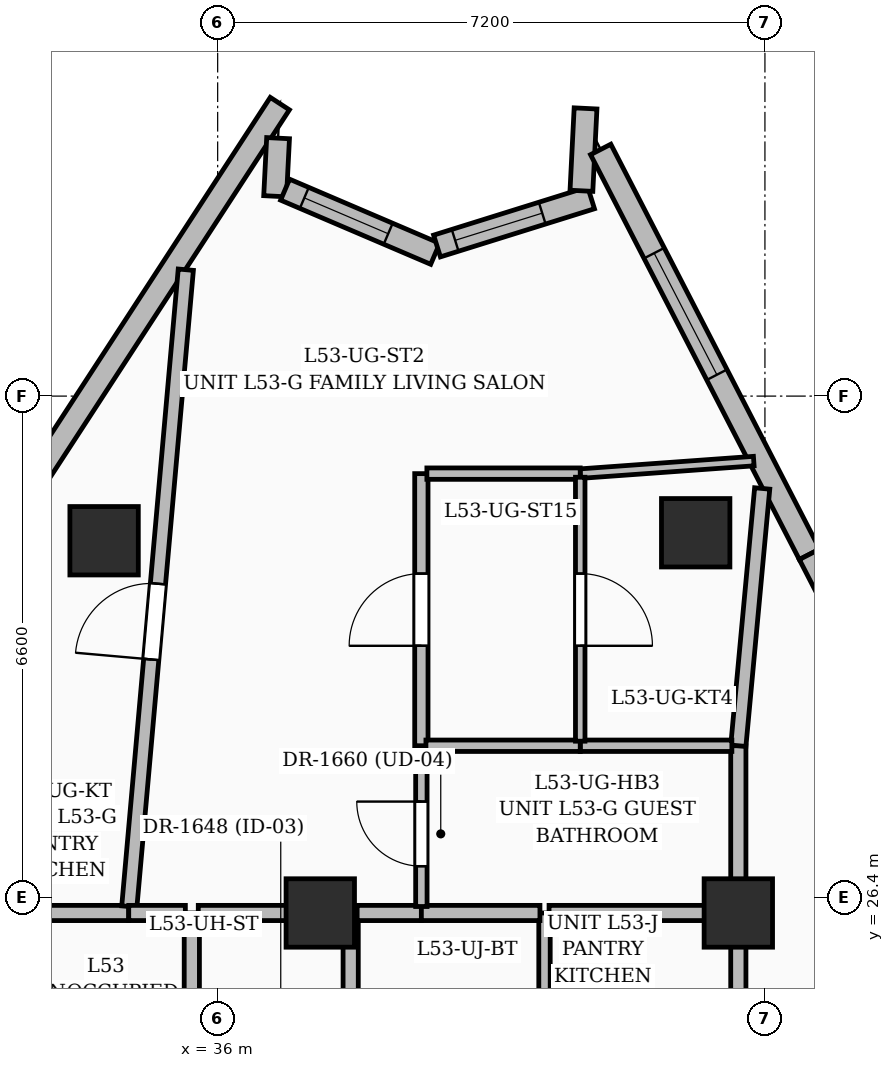
"""IFC4 building model, lengths in metres.
Left out: names, types, materials, properties, quantities, classifications, styles, units other than length and angle.
Written with IfcOpenShell. Run it as: python <this file> out.ifc"""

import sys

from ifc_helpers import new_model, si_unit, direction, frame, frame_2d, origin, origin_2d, place, context, subcontext, project, spatial, rectangle, extrude, element, fill, save


model = new_model("IFC4")
c1 = context("Model", 3, precision=1e-05, world=origin(), true_north=direction((0.0, 1.0)))
c2 = subcontext(c1, "Body", "Model", "MODEL_VIEW")
j1 = project(units=[si_unit("LENGTHUNIT", "METRE"), si_unit("PLANEANGLEUNIT", "RADIAN")], contexts=[c1])
p1 = place(None, origin())
s1 = spatial("IfcSite", under=j1, at=p1, CompositionType="ELEMENT")
p2 = place(p1, origin())
s2 = spatial("IfcBuilding", under=s1, at=p2, CompositionType="ELEMENT")
p3 = place(p2, frame((0.0, 0.0, 207.0)))
s3 = spatial("IfcBuildingStorey", under=s2, at=p3, CompositionType="ELEMENT", Elevation=207.0)
for number, where, z_axis, x_axis in (
    (1, (42.85, 26.2, 0.0), (0.0, 0.0, 1.0), (1.0, 0.0, 0.0)),
    (2, (37.35, 26.2, 0.0), (0.0, 0.0, 1.0), (1.0, 0.0, 0.0)),
    (3, (42.289, 31.202, 0.0), (0.0, 0.0, 1.0), (1.0, 0.0, 0.0)),
    (4, (34.506, 31.097, 0.0), (0.0, 0.0, 1.0), (1.0, 0.0, 0.0)),
):
    element("IfcColumn", number, at=place(p3, frame(where, z_axis=z_axis, x_axis=x_axis)), inside=s3, PredefinedType="COLUMN", context=c2, shape_type="SweptSolid", body=[
        extrude(rectangle(XDim=0.9, YDim=0.9, at=origin_2d()), origin(), (0.0, 0.0, 1.0), 3.75),
    ])
p4 = place(p3, frame((33.174, 31.251, 0.0), z_axis=(0.0, 0.0, 1.0), x_axis=(0.545624217243, 0.838029959821, 0.0)))
e5 = element("IfcWall", 5, at=p4, inside=s3, PredefinedType="SOLIDWALL", context=c2, shape_type="SweptSolid", body=[
    extrude(rectangle(XDim=6.679, YDim=0.3, at=frame_2d((3.339, 0.0))), origin(), (0.0, 0.0, 1.0), 3.5),
])
p5 = place(p3, frame((36.795, 36.394, 0.0), z_axis=(0.0, 0.0, 1.0), x_axis=(-0.051035290984, -0.998696850438, 0.0)))
e6 = element("IfcWall", 6, at=p5, inside=s3, PredefinedType="SOLIDWALL", context=c2, shape_type="SweptSolid", body=[
    extrude(rectangle(XDim=0.765, YDim=0.3, at=frame_2d((0.383, 0.0))), origin(), (0.0, 0.0, 1.0), 3.5),
])
p6 = place(p3, frame((36.887, 35.716, 0.0), z_axis=(0.0, 0.0, 1.0), x_axis=(0.919567916171, -0.392931097711, 0.0)))
e7 = element("IfcWall", 7, at=p6, inside=s3, PredefinedType="SOLIDWALL", context=c2, shape_type="SweptSolid", body=[
    extrude(rectangle(XDim=2.147, YDim=0.3, at=frame_2d((1.074, 0.0))), origin(), (0.0, 0.0, 1.0), 3.5),
])
p7 = place(p6, frame((0.275, 0.0, 0.8)))
e8 = element("IfcOpeningElement", 8, at=p7, cuts=e7, PredefinedType="OPENING", context=c2, shape_type="SweptSolid", body=[
    extrude(rectangle(XDim=1.2, YDim=1.8, at=frame_2d((0.6, 0.9))), frame((0.0, 0.16, 0.0), z_axis=(0.0, -1.0, 0.0), x_axis=(1.0, 0.0, 0.0)), (0.0, 0.0, 1.0), 0.32),
])
p8 = place(p3, frame((38.886, 34.975, 0.0), z_axis=(0.0, 0.0, 1.0), x_axis=(0.954524975295, 0.298130963736, 0.0)))
e9 = element("IfcWall", 9, at=p8, inside=s3, PredefinedType="SOLIDWALL", context=c2, shape_type="SweptSolid", body=[
    extrude(rectangle(XDim=2.124, YDim=0.3, at=frame_2d((1.062, 0.0))), origin(), (0.0, 0.0, 1.0), 3.5),
])
p9 = place(p8, frame((0.25, 0.0, 0.8)))
e10 = element("IfcOpeningElement", 10, at=p9, cuts=e9, PredefinedType="OPENING", context=c2, shape_type="SweptSolid", body=[
    extrude(rectangle(XDim=1.2, YDim=1.8, at=frame_2d((0.6, 0.9))), frame((0.0, 0.16, 0.0), z_axis=(0.0, -1.0, 0.0), x_axis=(1.0, 0.0, 0.0)), (0.0, 0.0, 1.0), 0.32),
])
p10 = place(p3, frame((40.786, 35.701, 0.0), z_axis=(0.0, 0.0, 1.0), x_axis=(0.05016199642, 0.998741094636, 0.0)))
e11 = element("IfcWall", 11, at=p10, inside=s3, PredefinedType="SOLIDWALL", context=c2, shape_type="SweptSolid", body=[
    extrude(rectangle(XDim=1.085, YDim=0.3, at=frame_2d((0.543, 0.0))), origin(), (0.0, 0.0, 1.0), 3.5),
])
p11 = place(p3, frame((41.039, 36.245, 0.0), z_axis=(0.0, 0.0, 1.0), x_axis=(0.458292150172, -0.888801611773, 0.0)))
e12 = element("IfcWall", 12, at=p11, inside=s3, PredefinedType="SOLIDWALL", context=c2, shape_type="SweptSolid", body=[
    extrude(rectangle(XDim=5.993, YDim=0.3, at=frame_2d((2.997, 0.0))), origin(), (0.0, 0.0, 1.0), 3.5),
])
p12 = place(p11, frame((1.535, 0.0, 0.6)))
e13 = element("IfcOpeningElement", 13, at=p12, cuts=e12, PredefinedType="OPENING", context=c2, shape_type="SweptSolid", body=[
    extrude(rectangle(XDim=1.8, YDim=2.1, at=frame_2d((0.9, 1.05))), frame((0.0, 0.16, 0.0), z_axis=(0.0, -1.0, 0.0), x_axis=(1.0, 0.0, 0.0)), (0.0, 0.0, 1.0), 0.32),
])
p13 = place(p3, frame((43.786, 30.918, 0.0), z_axis=(0.0, 0.0, 1.0), x_axis=(0.458349099599, -0.888772244671, 0.0)))
e14 = element("IfcWall", 14, at=p13, inside=s3, PredefinedType="SOLIDWALL", context=c2, shape_type="SweptSolid", body=[
    extrude(rectangle(XDim=6.583, YDim=0.3, at=frame_2d((3.292, 0.0))), origin(), (0.0, 0.0, 1.0), 3.5),
])
p14 = place(p13, frame((2.475, 0.0, 0.55)))
e15 = element("IfcOpeningElement", 15, at=p14, cuts=e14, PredefinedType="OPENING", context=c2, shape_type="SweptSolid", body=[
    extrude(rectangle(XDim=1.6, YDim=2.2, at=frame_2d((0.8, 1.1))), frame((0.0, 0.16, 0.0), z_axis=(0.0, -1.0, 0.0), x_axis=(1.0, 0.0, 0.0)), (0.0, 0.0, 1.0), 0.32),
])
p15 = place(p3, frame((33.485, 26.2, 0.0), z_axis=(0.0, 0.0, 1.0), x_axis=(1.0, 0.0, 0.0)))
e16 = element("IfcWall", 16, at=p15, inside=s3, PredefinedType="PARTITIONING", context=c2, shape_type="SweptSolid", body=[
    extrude(rectangle(XDim=1.345, YDim=0.2, at=frame_2d((0.672, 0.0))), origin(), (0.0, 0.0, 1.0), 3.061),
])
p16 = place(p3, frame((34.838, 26.285, 0.0), z_axis=(0.0, 0.0, 1.0), x_axis=(0.088352923437, 0.996089233412, 0.0)))
e17 = element("IfcWall", 17, at=p16, inside=s3, PredefinedType="PARTITIONING", context=c2, shape_type="SweptSolid", body=[
    extrude(rectangle(XDim=8.411, YDim=0.2, at=frame_2d((4.206, 0.0))), origin(), (0.0, 0.0, 1.0), 2.685),
])
p17 = place(p16, frame((3.264, 0.0, 0.0)))
e18 = element("IfcOpeningElement", 18, at=p17, cuts=e17, PredefinedType="OPENING", context=c2, shape_type="SweptSolid", body=[
    extrude(rectangle(XDim=1.0, YDim=2.2, at=frame_2d((0.5, 1.1))), frame((0.0, 0.11, 0.0), z_axis=(0.0, -1.0, 0.0), x_axis=(1.0, 0.0, 0.0)), (0.0, 0.0, 1.0), 0.22),
])
p18 = place(p3, frame((35.66, 26.2, 0.0), z_axis=(0.0, 0.0, 1.0), x_axis=(0.0, -1.0, 0.0)))
e19 = element("IfcWall", 19, at=p18, inside=s3, PredefinedType="PARTITIONING", context=c2, shape_type="SweptSolid", body=[
    extrude(rectangle(XDim=1.8, YDim=0.2, at=frame_2d((0.9, 0.0))), origin(), (0.0, 0.0, 1.0), 3.061),
])
p19 = place(p3, frame((37.75, 24.485, 0.0), z_axis=(0.0, 0.0, 1.0), x_axis=(0.0, 1.0, 0.0)))
e20 = element("IfcWall", 20, at=p19, inside=s3, PredefinedType="PARTITIONING", context=c2, shape_type="SweptSolid", body=[
    extrude(rectangle(XDim=1.715, YDim=0.2, at=frame_2d((0.857, 0.0))), origin(), (0.0, 0.0, 1.0), 2.685),
])
p20 = place(p3, frame((37.665, 26.2, 0.0), z_axis=(0.0, 0.0, 1.0), x_axis=(-1.0, 0.0, 0.0)))
e21 = element("IfcWall", 21, at=p20, inside=s3, PredefinedType="PARTITIONING", context=c2, shape_type="SweptSolid", body=[
    extrude(rectangle(XDim=1.92, YDim=0.2, at=frame_2d((0.96, 0.0))), origin(), (0.0, 0.0, 1.0), 3.061),
])
p21 = place(p3, frame((35.575, 26.2, 0.0), z_axis=(0.0, 0.0, 1.0), x_axis=(-1.0, 0.0, 0.0)))
e22 = element("IfcWall", 22, at=p21, inside=s3, PredefinedType="PARTITIONING", context=c2, shape_type="SweptSolid", body=[
    extrude(rectangle(XDim=0.745, YDim=0.2, at=frame_2d((0.373, 0.0))), origin(), (0.0, 0.0, 1.0), 3.061),
])
p22 = place(p3, frame((40.3, 26.2, 0.0), z_axis=(0.0, 0.0, 1.0), x_axis=(0.0, -1.0, 0.0)))
e23 = element("IfcWall", 23, at=p22, inside=s3, PredefinedType="PARTITIONING", context=c2, shape_type="SweptSolid", body=[
    extrude(rectangle(XDim=1.972, YDim=0.15, at=frame_2d((0.986, 0.0))), origin(), (0.0, 0.0, 1.0), 2.685),
])
p23 = place(p3, frame((42.85, 24.228, 0.0), z_axis=(0.0, 0.0, 1.0), x_axis=(0.0, 1.0, 0.0)))
e24 = element("IfcWall", 24, at=p23, inside=s3, PredefinedType="PARTITIONING", context=c2, shape_type="SweptSolid", body=[
    extrude(rectangle(XDim=1.972, YDim=0.2, at=frame_2d((0.986, 0.0))), origin(), (0.0, 0.0, 1.0), 2.685),
])
p24 = place(p3, frame((42.765, 26.2, 0.0), z_axis=(0.0, 0.0, 1.0), x_axis=(-1.0, 0.0, 0.0)))
e25 = element("IfcWall", 25, at=p24, inside=s3, PredefinedType="PARTITIONING", context=c2, shape_type="SweptSolid", body=[
    extrude(rectangle(XDim=2.405, YDim=0.2, at=frame_2d((1.202, 0.0))), origin(), (0.0, 0.0, 1.0), 2.685),
])
p25 = place(p3, frame((38.68, 26.2, 0.0), z_axis=(0.0, 0.0, 1.0), x_axis=(-1.0, 0.0, 0.0)))
e26 = element("IfcWall", 26, at=p25, inside=s3, PredefinedType="PARTITIONING", context=c2, shape_type="SweptSolid", body=[
    extrude(rectangle(XDim=0.845, YDim=0.2, at=frame_2d((0.422, 0.0))), origin(), (0.0, 0.0, 1.0), 2.685),
])
p26 = place(p3, frame((40.24, 26.2, 0.0), z_axis=(0.0, 0.0, 1.0), x_axis=(-1.0, 0.0, 0.0)))
e27 = element("IfcWall", 27, at=p26, inside=s3, PredefinedType="PARTITIONING", context=c2, shape_type="SweptSolid", body=[
    extrude(rectangle(XDim=1.56, YDim=0.2, at=frame_2d((0.78, 0.0))), origin(), (0.0, 0.0, 1.0), 2.685),
])
p27 = place(p3, frame((42.85, 28.4, 0.0), z_axis=(0.0, 0.0, 1.0), x_axis=(0.0, -1.0, 0.0)))
e28 = element("IfcWall", 28, at=p27, inside=s3, PredefinedType="PARTITIONING", context=c2, shape_type="SweptSolid", body=[
    extrude(rectangle(XDim=2.2, YDim=0.2, at=frame_2d((1.1, 0.0))), origin(), (0.0, 0.0, 1.0), 2.685),
])
p28 = place(p3, frame((43.164, 31.785, 0.0), z_axis=(0.0, 0.0, 1.0), x_axis=(-0.092355124874, -0.995726132483, 0.0)))
e29 = element("IfcWall", 29, at=p28, inside=s3, PredefinedType="PARTITIONING", context=c2, shape_type="SweptSolid", body=[
    extrude(rectangle(XDim=3.4, YDim=0.2, at=frame_2d((1.7, 0.0))), origin(), (0.0, 0.0, 1.0), 2.685),
])
p29 = place(p3, frame((38.68, 26.285, 0.0), z_axis=(0.0, 0.0, 1.0), x_axis=(0.0, 1.0, 0.0)))
e30 = element("IfcWall", 30, at=p29, inside=s3, PredefinedType="PARTITIONING", context=c2, shape_type="SweptSolid", body=[
    extrude(rectangle(XDim=2.115, YDim=0.15, at=frame_2d((1.058, 0.0))), origin(), (0.0, 0.0, 1.0), 2.685),
])
p30 = place(p29, frame((0.531, 0.0, 0.0)))
e31 = element("IfcOpeningElement", 31, at=p30, cuts=e30, PredefinedType="OPENING", context=c2, shape_type="SweptSolid", body=[
    extrude(rectangle(XDim=0.85, YDim=2.1, at=frame_2d((0.425, 1.05))), frame((0.0, 0.085, 0.0), z_axis=(0.0, -1.0, 0.0), x_axis=(1.0, 0.0, 0.0)), (0.0, 0.0, 1.0), 0.17),
])
p31 = place(p3, frame((40.77, 31.98, 0.0), z_axis=(0.0, 0.0, 1.0), x_axis=(0.997397150256, 0.072103568984, 0.0)))
e32 = element("IfcWall", 32, at=p31, inside=s3, PredefinedType="PARTITIONING", context=c2, shape_type="SweptSolid", body=[
    extrude(rectangle(XDim=2.289, YDim=0.125, at=frame_2d((1.145, 0.0))), origin(), (0.0, 0.0, 1.0), 3.5),
])
p32 = place(p3, frame((38.68, 28.4, 0.0), z_axis=(0.0, 0.0, 1.0), x_axis=(0.0, 1.0, 0.0)))
e33 = element("IfcWall", 33, at=p32, inside=s3, PredefinedType="PARTITIONING", context=c2, shape_type="SweptSolid", body=[
    extrude(rectangle(XDim=3.58, YDim=0.175, at=frame_2d((1.79, 0.0))), origin(), (0.0, 0.0, 1.0), 2.82),
])
p33 = place(p32, frame((1.315, 0.0, 0.0)))
e34 = element("IfcOpeningElement", 34, at=p33, cuts=e33, PredefinedType="OPENING", context=c2, shape_type="SweptSolid", body=[
    extrude(rectangle(XDim=0.95, YDim=2.2, at=frame_2d((0.475, 1.1))), frame((0.0, 0.097, 0.0), z_axis=(0.0, -1.0, 0.0), x_axis=(1.0, 0.0, 0.0)), (0.0, 0.0, 1.0), 0.195),
])
p34 = place(p3, frame((38.752, 31.98, 0.0), z_axis=(0.0, 0.0, 1.0), x_axis=(1.0, 0.0, 0.0)))
e35 = element("IfcWall", 35, at=p34, inside=s3, PredefinedType="PARTITIONING", context=c2, shape_type="SweptSolid", body=[
    extrude(rectangle(XDim=2.018, YDim=0.15, at=frame_2d((1.009, 0.0))), origin(), (0.0, 0.0, 1.0), 3.5),
])
p35 = place(p3, frame((42.765, 28.4, 0.0), z_axis=(0.0, 0.0, 1.0), x_axis=(-1.0, 0.0, 0.0)))
e36 = element("IfcWall", 36, at=p35, inside=s3, PredefinedType="PARTITIONING", context=c2, shape_type="SweptSolid", body=[
    extrude(rectangle(XDim=1.995, YDim=0.15, at=frame_2d((0.998, 0.0))), origin(), (0.0, 0.0, 1.0), 2.685),
])
p36 = place(p3, frame((40.77, 28.4, 0.0), z_axis=(0.0, 0.0, 1.0), x_axis=(-1.0, 0.0, 0.0)))
e37 = element("IfcWall", 37, at=p36, inside=s3, PredefinedType="PARTITIONING", context=c2, shape_type="SweptSolid", body=[
    extrude(rectangle(XDim=2.03, YDim=0.15, at=frame_2d((1.015, 0.0))), origin(), (0.0, 0.0, 1.0), 3.5),
])
p37 = place(p3, frame((40.77, 31.933, 0.0), z_axis=(0.0, 0.0, 1.0), x_axis=(0.0, -1.0, 0.0)))
e38 = element("IfcWall", 38, at=p37, inside=s3, PredefinedType="PARTITIONING", context=c2, shape_type="SweptSolid", body=[
    extrude(rectangle(XDim=3.473, YDim=0.125, at=frame_2d((1.736, 0.0))), origin(), (0.0, 0.0, 1.0), 2.82),
])
p38 = place(p37, frame((1.268, 0.0, 0.0)))
e39 = element("IfcOpeningElement", 39, at=p38, cuts=e38, PredefinedType="OPENING", context=c2, shape_type="SweptSolid", body=[
    extrude(rectangle(XDim=0.95, YDim=2.2, at=frame_2d((0.475, 1.1))), frame((0.0, 0.072, 0.0), z_axis=(0.0, -1.0, 0.0), x_axis=(1.0, 0.0, 0.0)), (0.0, 0.0, 1.0), 0.145),
])
p39 = place(p7, origin())
e40 = element("IfcWindow", 40, at=p39, inside=s3, PartitioningType="SINGLE_PANEL", PredefinedType="WINDOW", context=c2, shape_type="SweptSolid", body=[
    extrude(rectangle(XDim=1.2, YDim=1.8, at=frame_2d((0.6, 0.9))), frame((0.0, 0.03, 0.0), z_axis=(0.0, -1.0, 0.0), x_axis=(1.0, 0.0, 0.0)), (0.0, 0.0, 1.0), 0.06),
])
fill(e8, e40)
p40 = place(p9, origin())
e41 = element("IfcWindow", 41, at=p40, inside=s3, PartitioningType="SINGLE_PANEL", PredefinedType="WINDOW", context=c2, shape_type="SweptSolid", body=[
    extrude(rectangle(XDim=1.2, YDim=1.8, at=frame_2d((0.6, 0.9))), frame((0.0, 0.03, 0.0), z_axis=(0.0, -1.0, 0.0), x_axis=(1.0, 0.0, 0.0)), (0.0, 0.0, 1.0), 0.06),
])
fill(e10, e41)
p41 = place(p12, origin())
e42 = element("IfcWindow", 42, at=p41, inside=s3, PartitioningType="SINGLE_PANEL", PredefinedType="WINDOW", context=c2, shape_type="SweptSolid", body=[
    extrude(rectangle(XDim=1.8, YDim=2.1, at=frame_2d((0.9, 1.05))), frame((0.0, 0.03, 0.0), z_axis=(0.0, -1.0, 0.0), x_axis=(1.0, 0.0, 0.0)), (0.0, 0.0, 1.0), 0.06),
])
fill(e13, e42)
p42 = place(p38, origin())
e43 = element("IfcDoor", 43, at=p42, inside=s3, OperationType="SINGLE_SWING_RIGHT", PredefinedType="DOOR", context=c2, shape_type="SweptSolid", body=[
    extrude(rectangle(XDim=0.95, YDim=2.2, at=frame_2d((0.475, 1.1))), frame((0.0, 0.025, 0.0), z_axis=(0.0, -1.0, 0.0), x_axis=(1.0, 0.0, 0.0)), (0.0, 0.0, 1.0), 0.05),
])
fill(e39, e43)
p43 = place(p33, origin())
e44 = element("IfcDoor", 44, at=p43, inside=s3, OperationType="SINGLE_SWING_LEFT", PredefinedType="DOOR", context=c2, shape_type="SweptSolid", body=[
    extrude(rectangle(XDim=0.95, YDim=2.2, at=frame_2d((0.475, 1.1))), frame((0.0, 0.025, 0.0), z_axis=(0.0, -1.0, 0.0), x_axis=(1.0, 0.0, 0.0)), (0.0, 0.0, 1.0), 0.05),
])
fill(e34, e44)
p44 = place(p30, origin())
e45 = element("IfcDoor", 45, at=p44, inside=s3, OperationType="SINGLE_SWING_RIGHT", PredefinedType="DOOR", context=c2, shape_type="SweptSolid", body=[
    extrude(rectangle(XDim=0.85, YDim=2.1, at=frame_2d((0.425, 1.05))), frame((0.0, 0.025, 0.0), z_axis=(0.0, -1.0, 0.0), x_axis=(1.0, 0.0, 0.0)), (0.0, 0.0, 1.0), 0.05),
])
fill(e31, e45)
p45 = place(p17, origin())
e46 = element("IfcDoor", 46, at=p45, inside=s3, OperationType="SINGLE_SWING_LEFT", PredefinedType="DOOR", context=c2, shape_type="SweptSolid", body=[
    extrude(rectangle(XDim=1.0, YDim=2.2, at=frame_2d((0.5, 1.1))), frame((0.0, 0.025, 0.0), z_axis=(0.0, -1.0, 0.0), x_axis=(1.0, 0.0, 0.0)), (0.0, 0.0, 1.0), 0.05),
])
fill(e18, e46)
save(model, sys.argv[1])
